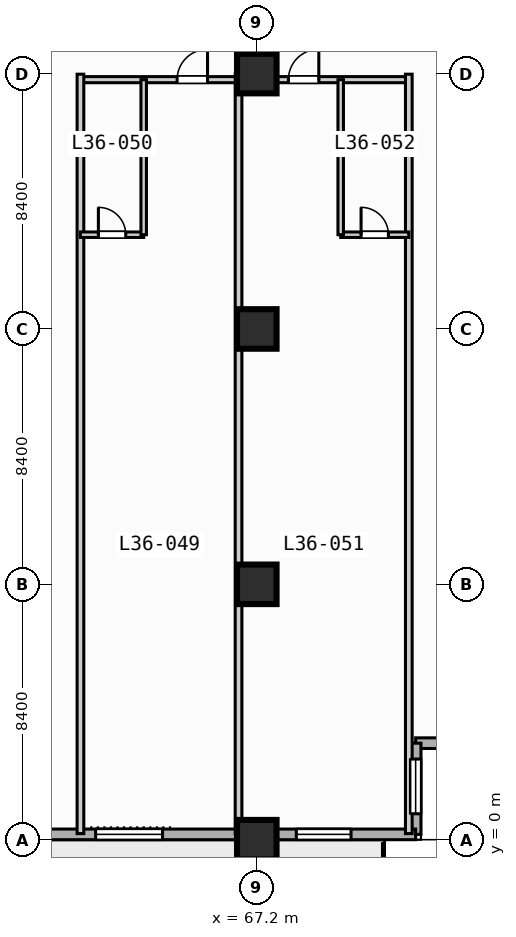
"""IFC4 building model, lengths in metres.
Left out: names, types, materials, properties, quantities, classifications, styles, units other than length and angle.
Written with IfcOpenShell. Run it as: python <this file> out.ifc"""

import sys

from ifc_helpers import new_model, si_unit, direction, frame, frame_2d, origin, origin_2d, place, context, subcontext, project, spatial, rectangle, extrude, element, fill, save


model = new_model("IFC4")
c1 = context("Model", 3, precision=1e-05, world=origin(), true_north=direction((0.0, 1.0)))
c2 = subcontext(c1, "Body", "Model", "MODEL_VIEW")
j1 = project(units=[si_unit("LENGTHUNIT", "METRE"), si_unit("PLANEANGLEUNIT", "RADIAN")], contexts=[c1])
p1 = place(None, origin())
s1 = spatial("IfcSite", under=j1, at=p1, CompositionType="ELEMENT")
p2 = place(p1, origin())
s2 = spatial("IfcBuilding", under=s1, at=p2, CompositionType="ELEMENT")
p3 = place(p2, frame((0.0, 0.0, 149.4)))
s3 = spatial("IfcBuildingStorey", under=s2, at=p3, CompositionType="ELEMENT", Elevation=149.4)
for number, where, z_axis, x_axis in (
    (1, (67.2, 0.0, 0.0), (0.0, 0.0, 1.0), (1.0, 0.0, 0.0)),
    (2, (67.2, 8.4, 0.0), (0.0, 0.0, 1.0), (1.0, 0.0, 0.0)),
    (3, (67.2, 16.8, 0.0), (0.0, 0.0, 1.0), (1.0, 0.0, 0.0)),
    (4, (67.2, 25.2, 0.0), (0.0, 0.0, 1.0), (1.0, 0.0, 0.0)),
):
    element("IfcColumn", number, at=place(p3, frame(where, z_axis=z_axis, x_axis=x_axis)), inside=s3, PredefinedType="COLUMN", context=c2, shape_type="SweptSolid", body=[
        extrude(rectangle(XDim=1.3, YDim=1.3, at=origin_2d()), origin(), (0.0, 0.0, 1.0), 3.8),
    ])
p4 = place(p3, frame((75.425, 3.175, 0.0), z_axis=(0.0, 0.0, 1.0), x_axis=(-1.0, 0.0, 0.0)))
e5 = element("IfcWall", 5, at=p4, inside=s3, PredefinedType="STANDARD", context=c2, shape_type="SweptSolid", body=[
    extrude(rectangle(XDim=3.0, YDim=0.35, at=frame_2d((1.5, 0.0))), origin(), (0.0, 0.0, 1.0), 3.55),
])
p5 = place(p3, frame((72.425, 3.175, 0.0), z_axis=(0.0, 0.0, 1.0), x_axis=(0.0, -1.0, 0.0)))
e6 = element("IfcWall", 6, at=p5, inside=s3, PredefinedType="STANDARD", context=c2, shape_type="SweptSolid", body=[
    extrude(rectangle(XDim=3.0, YDim=0.35, at=frame_2d((1.5, 0.0))), origin(), (0.0, 0.0, 1.0), 3.55),
])
p6 = place(p5, frame((0.522, 0.0, 0.85)))
e7 = element("IfcOpeningElement", 7, at=p6, cuts=e6, PredefinedType="OPENING", context=c2, shape_type="SweptSolid", body=[
    extrude(rectangle(XDim=1.8, YDim=1.8, at=frame_2d((0.9, 0.9))), frame((0.0, 0.185, 0.0), z_axis=(0.0, -1.0, 0.0), x_axis=(1.0, 0.0, 0.0)), (0.0, 0.0, 1.0), 0.37),
])
p7 = place(p3, frame((72.425, 0.175, 0.0), z_axis=(0.0, 0.0, 1.0), x_axis=(-1.0, 0.0, 0.0)))
e8 = element("IfcWall", 8, at=p7, inside=s3, PredefinedType="STANDARD", context=c2, shape_type="SweptSolid", body=[
    extrude(rectangle(XDim=69.25, YDim=0.35, at=frame_2d((34.625, 0.0))), origin(), (0.0, 0.0, 1.0), 3.55),
])
p8 = place(p7, frame((50.725, 0.0, 0.0)))
e9 = element("IfcOpeningElement", 9, at=p8, cuts=e8, PredefinedType="OPENING", context=c2, shape_type="SweptSolid", body=[
    extrude(rectangle(XDim=1.4, YDim=2.2, at=frame_2d((0.7, 1.1))), frame((0.0, 0.185, 0.0), z_axis=(0.0, -1.0, 0.0), x_axis=(1.0, 0.0, 0.0)), (0.0, 0.0, 1.0), 0.37),
])
p9 = place(p7, frame((58.725, 0.0, 0.85)))
e10 = element("IfcOpeningElement", 10, at=p9, cuts=e8, PredefinedType="OPENING", context=c2, shape_type="SweptSolid", body=[
    extrude(rectangle(XDim=2.2, YDim=1.8, at=frame_2d((1.1, 0.9))), frame((0.0, 0.185, 0.0), z_axis=(0.0, -1.0, 0.0), x_axis=(1.0, 0.0, 0.0)), (0.0, 0.0, 1.0), 0.37),
])
p10 = place(p7, frame((33.525, 0.0, 0.85)))
e11 = element("IfcOpeningElement", 11, at=p10, cuts=e8, PredefinedType="OPENING", context=c2, shape_type="SweptSolid", body=[
    extrude(rectangle(XDim=2.2, YDim=1.8, at=frame_2d((1.1, 0.9))), frame((0.0, 0.185, 0.0), z_axis=(0.0, -1.0, 0.0), x_axis=(1.0, 0.0, 0.0)), (0.0, 0.0, 1.0), 0.37),
])
p11 = place(p7, frame((25.125, 0.0, 0.85)))
e12 = element("IfcOpeningElement", 12, at=p11, cuts=e8, PredefinedType="OPENING", context=c2, shape_type="SweptSolid", body=[
    extrude(rectangle(XDim=2.2, YDim=1.8, at=frame_2d((1.1, 0.9))), frame((0.0, 0.185, 0.0), z_axis=(0.0, -1.0, 0.0), x_axis=(1.0, 0.0, 0.0)), (0.0, 0.0, 1.0), 0.37),
])
p12 = place(p7, frame((8.325, 0.0, 0.85)))
e13 = element("IfcOpeningElement", 13, at=p12, cuts=e8, PredefinedType="OPENING", context=c2, shape_type="SweptSolid", body=[
    extrude(rectangle(XDim=2.2, YDim=1.8, at=frame_2d((1.1, 0.9))), frame((0.0, 0.185, 0.0), z_axis=(0.0, -1.0, 0.0), x_axis=(1.0, 0.0, 0.0)), (0.0, 0.0, 1.0), 0.37),
])
p13 = place(p7, frame((2.125, 0.0, 0.85)))
e14 = element("IfcOpeningElement", 14, at=p13, cuts=e8, PredefinedType="OPENING", context=c2, shape_type="SweptSolid", body=[
    extrude(rectangle(XDim=1.8, YDim=1.8, at=frame_2d((0.9, 0.9))), frame((0.0, 0.185, 0.0), z_axis=(0.0, -1.0, 0.0), x_axis=(1.0, 0.0, 0.0)), (0.0, 0.0, 1.0), 0.37),
])
p14 = place(p3, frame((61.4, 25.0, 0.0), z_axis=(0.0, 0.0, 1.0), x_axis=(1.0, 0.0, 0.0)))
e15 = element("IfcWall", 15, at=p14, inside=s3, PredefinedType="PARTITIONING", context=c2, shape_type="SweptSolid", body=[
    extrude(rectangle(XDim=10.8, YDim=0.2, at=frame_2d((5.4, 0.0))), origin(), (0.0, 0.0, 1.0), 2.9),
])
p15 = place(p14, frame((3.18, 0.0, 0.0)))
e16 = element("IfcOpeningElement", 16, at=p15, cuts=e15, PredefinedType="OPENING", context=c2, shape_type="SweptSolid", body=[
    extrude(rectangle(XDim=1.0, YDim=2.15, at=frame_2d((0.5, 1.075))), frame((0.0, 0.11, 0.0), z_axis=(0.0, -1.0, 0.0), x_axis=(1.0, 0.0, 0.0)), (0.0, 0.0, 1.0), 0.22),
])
p16 = place(p14, frame((6.84, 0.0, 0.0)))
e17 = element("IfcOpeningElement", 17, at=p16, cuts=e15, PredefinedType="OPENING", context=c2, shape_type="SweptSolid", body=[
    extrude(rectangle(XDim=1.0, YDim=2.15, at=frame_2d((0.5, 1.075))), frame((0.0, 0.11, 0.0), z_axis=(0.0, -1.0, 0.0), x_axis=(1.0, 0.0, 0.0)), (0.0, 0.0, 1.0), 0.22),
])
p17 = place(p3, frame((61.4, 0.2, 0.0), z_axis=(0.0, 0.0, 1.0), x_axis=(0.0, 1.0, 0.0)))
e18 = element("IfcWall", 18, at=p17, inside=s3, PredefinedType="PARTITIONING", context=c2, shape_type="SweptSolid", body=[
    extrude(rectangle(XDim=24.98, YDim=0.22, at=frame_2d((12.49, 0.0))), origin(), (0.0, 0.0, 1.0), 3.55),
])
p18 = place(p3, frame((61.4, 19.9, 0.0), z_axis=(0.0, 0.0, 1.0), x_axis=(1.0, 0.0, 0.0)))
e19 = element("IfcWall", 19, at=p18, inside=s3, PredefinedType="PLUMBINGWALL", context=c2, shape_type="SweptSolid", body=[
    extrude(rectangle(XDim=2.08, YDim=0.18, at=frame_2d((1.04, 0.0))), origin(), (0.0, 0.0, 1.0), 3.55),
])
p19 = place(p18, frame((0.59, 0.0, 0.0)))
e20 = element("IfcOpeningElement", 20, at=p19, cuts=e19, PredefinedType="OPENING", context=c2, shape_type="SweptSolid", body=[
    extrude(rectangle(XDim=0.9, YDim=2.1, at=frame_2d((0.45, 1.05))), frame((0.0, 0.1, 0.0), z_axis=(0.0, -1.0, 0.0), x_axis=(1.0, 0.0, 0.0)), (0.0, 0.0, 1.0), 0.2),
])
p20 = place(p3, frame((63.48, 19.9, 0.0), z_axis=(0.0, 0.0, 1.0), x_axis=(0.0, 1.0, 0.0)))
e21 = element("IfcWall", 21, at=p20, inside=s3, PredefinedType="PLUMBINGWALL", context=c2, shape_type="SweptSolid", body=[
    extrude(rectangle(XDim=5.1, YDim=0.18, at=frame_2d((2.55, 0.0))), origin(), (0.0, 0.0, 1.0), 3.55),
])
for number, where, z_axis, x_axis in (
    (22, (66.6, 0.2, 0.0), (0.0, 0.0, 1.0), (0.0, 1.0, 0.0)),
    (23, (72.2, 0.2, 0.0), (0.0, 0.0, 1.0), (0.0, 1.0, 0.0)),
):
    element("IfcWall", number, at=place(p3, frame(where, z_axis=z_axis, x_axis=x_axis)), inside=s3, PredefinedType="PARTITIONING", context=c2, shape_type="SweptSolid", body=[
        extrude(rectangle(XDim=24.98, YDim=0.22, at=frame_2d((12.49, 0.0))), origin(), (0.0, 0.0, 1.0), 3.55),
    ])
p21 = place(p3, frame((69.96, 19.9, 0.0), z_axis=(0.0, 0.0, 1.0), x_axis=(1.0, 0.0, 0.0)))
e24 = element("IfcWall", 24, at=p21, inside=s3, PredefinedType="PLUMBINGWALL", context=c2, shape_type="SweptSolid", body=[
    extrude(rectangle(XDim=2.24, YDim=0.18, at=frame_2d((1.12, 0.0))), origin(), (0.0, 0.0, 1.0), 3.55),
])
p22 = place(p21, frame((0.67, 0.0, 0.0)))
e25 = element("IfcOpeningElement", 25, at=p22, cuts=e24, PredefinedType="OPENING", context=c2, shape_type="SweptSolid", body=[
    extrude(rectangle(XDim=0.9, YDim=2.1, at=frame_2d((0.45, 1.05))), frame((0.0, 0.1, 0.0), z_axis=(0.0, -1.0, 0.0), x_axis=(1.0, 0.0, 0.0)), (0.0, 0.0, 1.0), 0.2),
])
p23 = place(p3, frame((69.96, 19.9, 0.0), z_axis=(0.0, 0.0, 1.0), x_axis=(0.0, 1.0, 0.0)))
e26 = element("IfcWall", 26, at=p23, inside=s3, PredefinedType="PLUMBINGWALL", context=c2, shape_type="SweptSolid", body=[
    extrude(rectangle(XDim=5.1, YDim=0.18, at=frame_2d((2.55, 0.0))), origin(), (0.0, 0.0, 1.0), 3.55),
])
p24 = place(p6, origin())
e27 = element("IfcWindow", 27, at=p24, inside=s3, PartitioningType="SINGLE_PANEL", PredefinedType="WINDOW", context=c2, shape_type="SweptSolid", body=[
    extrude(rectangle(XDim=1.8, YDim=1.8, at=frame_2d((0.9, 0.9))), frame((0.0, 0.03, 0.0), z_axis=(0.0, -1.0, 0.0), x_axis=(1.0, 0.0, 0.0)), (0.0, 0.0, 1.0), 0.06),
])
fill(e7, e27)
p25 = place(p12, origin())
e28 = element("IfcWindow", 28, at=p25, inside=s3, PartitioningType="SINGLE_PANEL", PredefinedType="WINDOW", context=c2, shape_type="SweptSolid", body=[
    extrude(rectangle(XDim=2.2, YDim=1.8, at=frame_2d((1.1, 0.9))), frame((0.0, 0.03, 0.0), z_axis=(0.0, -1.0, 0.0), x_axis=(1.0, 0.0, 0.0)), (0.0, 0.0, 1.0), 0.06),
])
fill(e13, e28)
p26 = place(p13, origin())
e29 = element("IfcWindow", 29, at=p26, inside=s3, PartitioningType="SINGLE_PANEL", PredefinedType="WINDOW", context=c2, shape_type="SweptSolid", body=[
    extrude(rectangle(XDim=1.8, YDim=1.8, at=frame_2d((0.9, 0.9))), frame((0.0, 0.03, 0.0), z_axis=(0.0, -1.0, 0.0), x_axis=(1.0, 0.0, 0.0)), (0.0, 0.0, 1.0), 0.06),
])
fill(e14, e29)
p27 = place(p15, origin())
e30 = element("IfcDoor", 30, at=p27, inside=s3, OperationType="SINGLE_SWING_RIGHT", PredefinedType="DOOR", context=c2, shape_type="SweptSolid", body=[
    extrude(rectangle(XDim=1.0, YDim=2.15, at=frame_2d((0.5, 1.075))), frame((0.0, 0.025, 0.0), z_axis=(0.0, -1.0, 0.0), x_axis=(1.0, 0.0, 0.0)), (0.0, 0.0, 1.0), 0.05),
])
fill(e16, e30)
p28 = place(p16, origin())
e31 = element("IfcDoor", 31, at=p28, inside=s3, OperationType="SINGLE_SWING_RIGHT", PredefinedType="DOOR", context=c2, shape_type="SweptSolid", body=[
    extrude(rectangle(XDim=1.0, YDim=2.15, at=frame_2d((0.5, 1.075))), frame((0.0, 0.025, 0.0), z_axis=(0.0, -1.0, 0.0), x_axis=(1.0, 0.0, 0.0)), (0.0, 0.0, 1.0), 0.05),
])
fill(e17, e31)
p29 = place(p19, origin())
e32 = element("IfcDoor", 32, at=p29, inside=s3, OperationType="SINGLE_SWING_LEFT", PredefinedType="DOOR", context=c2, shape_type="SweptSolid", body=[
    extrude(rectangle(XDim=0.9, YDim=2.1, at=frame_2d((0.45, 1.05))), frame((0.0, 0.025, 0.0), z_axis=(0.0, -1.0, 0.0), x_axis=(1.0, 0.0, 0.0)), (0.0, 0.0, 1.0), 0.05),
])
fill(e20, e32)
p30 = place(p22, origin())
e33 = element("IfcDoor", 33, at=p30, inside=s3, OperationType="SINGLE_SWING_LEFT", PredefinedType="DOOR", context=c2, shape_type="SweptSolid", body=[
    extrude(rectangle(XDim=0.9, YDim=2.1, at=frame_2d((0.45, 1.05))), frame((0.0, 0.025, 0.0), z_axis=(0.0, -1.0, 0.0), x_axis=(1.0, 0.0, 0.0)), (0.0, 0.0, 1.0), 0.05),
])
fill(e25, e33)
save(model, sys.argv[1])
